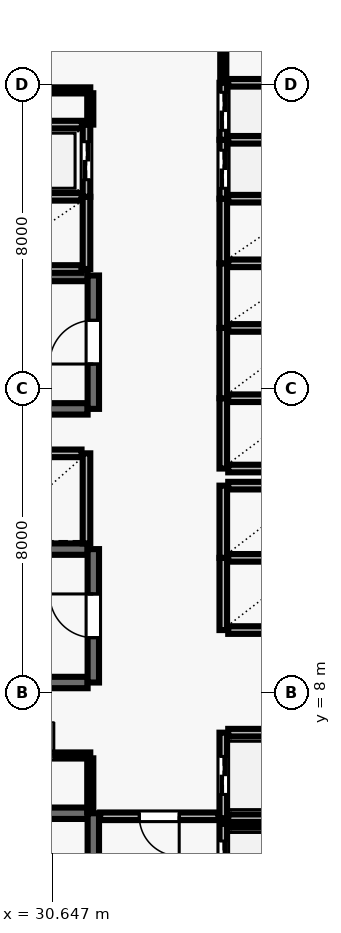
"""IFC4 building model, lengths in metres.
Left out: names, types, materials, properties, quantities, classifications, styles, units other than length and angle.
Written with IfcOpenShell. Run it as: python <this file> out.ifc"""

import sys

from ifc_helpers import new_model, si_unit, direction, frame, frame_2d, origin, place, context, subcontext, project, spatial, rectangle, extrude, element, fill, save


model = new_model("IFC4")
c1 = context("Model", 3, precision=1e-05, world=origin(), true_north=direction((0.0, 1.0)))
c2 = subcontext(c1, "Body", "Model", "MODEL_VIEW")
j1 = project(units=[si_unit("LENGTHUNIT", "METRE"), si_unit("PLANEANGLEUNIT", "RADIAN")], contexts=[c1])
p1 = place(None, origin())
s1 = spatial("IfcSite", under=j1, at=p1, CompositionType="ELEMENT")
p2 = place(p1, origin())
s2 = spatial("IfcBuilding", under=s1, at=p2, CompositionType="ELEMENT")
p3 = place(p2, frame((0.0, 0.0, 81.7)))
s3 = spatial("IfcBuildingStorey", under=s2, at=p3, CompositionType="ELEMENT", Elevation=81.7)
p4 = place(p3, frame((31.58, 4.83, 0.0), z_axis=(0.0, 0.0, 1.0), x_axis=(-1.0, 0.0, 0.0)))
e1 = element("IfcWall", 1, at=p4, inside=s3, PredefinedType="SHEAR", context=c2, shape_type="SweptSolid", body=[
    extrude(rectangle(XDim=8.36, YDim=0.3, at=frame_2d((4.18, 0.0))), origin(), (0.0, 0.0, 1.0), 3.69),
])
p5 = place(p3, frame((31.73, 0.96, 0.0), z_axis=(0.0, 0.0, 1.0), x_axis=(0.0, 1.0, 0.0)))
e2 = element("IfcWall", 2, at=p5, inside=s3, PredefinedType="SHEAR", context=c2, shape_type="SweptSolid", body=[
    extrude(rectangle(XDim=3.87, YDim=0.3, at=frame_2d((1.935, 0.0))), origin(), (0.0, 0.0, 1.0), 3.69),
])
p6 = place(p5, frame((1.54, 0.0, 0.0)))
e3 = element("IfcOpeningElement", 3, at=p6, cuts=e2, PredefinedType="OPENING", context=c2, shape_type="SweptSolid", body=[
    extrude(rectangle(XDim=1.15, YDim=2.15, at=frame_2d((0.575, 1.075))), frame((0.0, 0.16, 0.0), z_axis=(0.0, -1.0, 0.0), x_axis=(1.0, 0.0, 0.0)), (0.0, 0.0, 1.0), 0.32),
])
for number, where, z_axis, x_axis in (
    (4, (31.58, 18.98, 0.0), (0.0, 0.0, 1.0), (-1.0, 0.0, 0.0)),
    (5, (23.22, 15.47, 0.0), (0.0, 0.0, 1.0), (1.0, 0.0, 0.0)),
):
    element("IfcWall", number, at=place(p3, frame(where, z_axis=z_axis, x_axis=x_axis)), inside=s3, PredefinedType="SHEAR", context=c2, shape_type="SweptSolid", body=[
        extrude(rectangle(XDim=8.36, YDim=0.3, at=frame_2d((4.18, 0.0))), origin(), (0.0, 0.0, 1.0), 3.69),
    ])
p7 = place(p3, frame((31.73, 15.47, 0.0), z_axis=(0.0, 0.0, 1.0), x_axis=(0.0, 1.0, 0.0)))
e6 = element("IfcWall", 6, at=p7, inside=s3, PredefinedType="SHEAR", context=c2, shape_type="SweptSolid", body=[
    extrude(rectangle(XDim=3.51, YDim=0.3, at=frame_2d((1.755, 0.0))), origin(), (0.0, 0.0, 1.0), 3.69),
])
p8 = place(p7, frame((1.18, 0.0, 0.0)))
e7 = element("IfcOpeningElement", 7, at=p8, cuts=e6, PredefinedType="OPENING", context=c2, shape_type="SweptSolid", body=[
    extrude(rectangle(XDim=1.15, YDim=2.15, at=frame_2d((0.575, 1.075))), frame((0.0, 0.16, 0.0), z_axis=(0.0, -1.0, 0.0), x_axis=(1.0, 0.0, 0.0)), (0.0, 0.0, 1.0), 0.32),
])
for number, where, z_axis, x_axis in (
    (8, (31.58, 11.78, 0.0), (0.0, 0.0, 1.0), (-1.0, 0.0, 0.0)),
    (9, (23.22, 8.27, 0.0), (0.0, 0.0, 1.0), (1.0, 0.0, 0.0)),
):
    element("IfcWall", number, at=place(p3, frame(where, z_axis=z_axis, x_axis=x_axis)), inside=s3, PredefinedType="SHEAR", context=c2, shape_type="SweptSolid", body=[
        extrude(rectangle(XDim=8.36, YDim=0.3, at=frame_2d((4.18, 0.0))), origin(), (0.0, 0.0, 1.0), 3.69),
    ])
p9 = place(p3, frame((31.73, 8.27, 0.0), z_axis=(0.0, 0.0, 1.0), x_axis=(0.0, 1.0, 0.0)))
e10 = element("IfcWall", 10, at=p9, inside=s3, PredefinedType="SHEAR", context=c2, shape_type="SweptSolid", body=[
    extrude(rectangle(XDim=3.51, YDim=0.3, at=frame_2d((1.755, 0.0))), origin(), (0.0, 0.0, 1.0), 3.69),
])
p10 = place(p9, frame((1.18, 0.0, 0.0)))
e11 = element("IfcOpeningElement", 11, at=p10, cuts=e10, PredefinedType="OPENING", context=c2, shape_type="SweptSolid", body=[
    extrude(rectangle(XDim=1.15, YDim=2.15, at=frame_2d((0.575, 1.075))), frame((0.0, 0.16, 0.0), z_axis=(0.0, -1.0, 0.0), x_axis=(1.0, 0.0, 0.0)), (0.0, 0.0, 1.0), 0.32),
])
p11 = place(p3, frame((35.15, 4.55, 0.0), z_axis=(0.0, 0.0, 1.0), x_axis=(0.0, -1.0, 0.0)))
e12 = element("IfcWall", 12, at=p11, inside=s3, PredefinedType="SOLIDWALL", context=c2, shape_type="SweptSolid", body=[
    extrude(rectangle(XDim=2.1, YDim=0.2, at=frame_2d((1.05, 0.0))), origin(), (0.0, 0.0, 1.0), 3.69),
])
p12 = place(p11, frame((0.45, 0.0, 0.0)))
e13 = element("IfcOpeningElement", 13, at=p12, cuts=e12, PredefinedType="OPENING", context=c2, shape_type="SweptSolid", body=[
    extrude(rectangle(XDim=1.2, YDim=2.15, at=frame_2d((0.6, 1.075))), frame((0.0, 0.11, 0.0), z_axis=(0.0, -1.0, 0.0), x_axis=(1.0, 0.0, 0.0)), (0.0, 0.0, 1.0), 0.22),
])
p13 = place(p3, frame((37.42, 4.55, 0.0), z_axis=(0.0, 0.0, 1.0), x_axis=(-1.0, 0.0, 0.0)))
e14 = element("IfcWall", 14, at=p13, inside=s3, PredefinedType="SOLIDWALL", context=c2, shape_type="SweptSolid", body=[
    extrude(rectangle(XDim=2.14, YDim=0.2, at=frame_2d((1.07, 0.0))), origin(), (0.0, 0.0, 1.0), 3.69),
])
p14 = place(p3, frame((35.15, 6.95, 0.0), z_axis=(0.0, 0.0, 1.0), x_axis=(0.0, -1.0, 0.0)))
e15 = element("IfcWall", 15, at=p14, inside=s3, PredefinedType="SOLIDWALL", context=c2, shape_type="SweptSolid", body=[
    extrude(rectangle(XDim=2.25, YDim=0.2, at=frame_2d((1.125, 0.0))), origin(), (0.0, 0.0, 1.0), 3.69),
])
p15 = place(p14, frame((0.625, 0.0, 0.0)))
e16 = element("IfcOpeningElement", 16, at=p15, cuts=e15, PredefinedType="OPENING", context=c2, shape_type="SweptSolid", body=[
    extrude(rectangle(XDim=1.0, YDim=2.1, at=frame_2d((0.5, 1.05))), frame((0.0, 0.11, 0.0), z_axis=(0.0, -1.0, 0.0), x_axis=(1.0, 0.0, 0.0)), (0.0, 0.0, 1.0), 0.22),
])
for number, where, z_axis, x_axis in (
    (17, (35.28, 4.7, 0.0), (0.0, 0.0, 1.0), (1.0, 0.0, 0.0)),
    (18, (37.42, 6.95, 0.0), (0.0, 0.0, 1.0), (-1.0, 0.0, 0.0)),
):
    element("IfcWall", number, at=place(p3, frame(where, z_axis=z_axis, x_axis=x_axis)), inside=s3, PredefinedType="SOLIDWALL", context=c2, shape_type="SweptSolid", body=[
        extrude(rectangle(XDim=2.14, YDim=0.2, at=frame_2d((1.07, 0.0))), origin(), (0.0, 0.0, 1.0), 3.69),
    ])
p16 = place(p3, frame((35.15, 11.55, 0.0), z_axis=(0.0, 0.0, 1.0), x_axis=(0.0, -1.0, 0.0)))
e19 = element("IfcWall", 19, at=p16, inside=s3, PredefinedType="SOLIDWALL", context=c2, shape_type="SweptSolid", body=[
    extrude(rectangle(XDim=1.9, YDim=0.2, at=frame_2d((0.95, 0.0))), origin(), (0.0, 0.0, 1.0), 3.69),
])
for number, where, z_axis, x_axis in (
    (20, (35.28, 9.65, 0.0), (0.0, 0.0, 1.0), (1.0, 0.0, 0.0)),
    (21, (37.42, 11.55, 0.0), (0.0, 0.0, 1.0), (-1.0, 0.0, 0.0)),
):
    element("IfcWall", number, at=place(p3, frame(where, z_axis=z_axis, x_axis=x_axis)), inside=s3, PredefinedType="SOLIDWALL", context=c2, shape_type="SweptSolid", body=[
        extrude(rectangle(XDim=2.14, YDim=0.2, at=frame_2d((1.07, 0.0))), origin(), (0.0, 0.0, 1.0), 3.69),
    ])
p17 = place(p3, frame((35.15, 13.45, 0.0), z_axis=(0.0, 0.0, 1.0), x_axis=(0.0, -1.0, 0.0)))
e22 = element("IfcWall", 22, at=p17, inside=s3, PredefinedType="SOLIDWALL", context=c2, shape_type="SweptSolid", body=[
    extrude(rectangle(XDim=1.9, YDim=0.2, at=frame_2d((0.95, 0.0))), origin(), (0.0, 0.0, 1.0), 3.69),
])
p18 = place(p3, frame((37.42, 13.45, 0.0), z_axis=(0.0, 0.0, 1.0), x_axis=(-1.0, 0.0, 0.0)))
e23 = element("IfcWall", 23, at=p18, inside=s3, PredefinedType="SOLIDWALL", context=c2, shape_type="SweptSolid", body=[
    extrude(rectangle(XDim=2.14, YDim=0.2, at=frame_2d((1.07, 0.0))), origin(), (0.0, 0.0, 1.0), 3.69),
])
p19 = place(p3, frame((31.55, 11.93, 0.0), z_axis=(0.0, 0.0, 1.0), x_axis=(0.0, 1.0, 0.0)))
e24 = element("IfcWall", 24, at=p19, inside=s3, PredefinedType="SOLIDWALL", context=c2, shape_type="SweptSolid", body=[
    extrude(rectangle(XDim=2.37, YDim=0.2, at=frame_2d((1.185, 0.0))), origin(), (0.0, 0.0, 1.0), 3.69),
])
p20 = place(p3, frame((31.42, 14.3, 0.0), z_axis=(0.0, 0.0, 1.0), x_axis=(-1.0, 0.0, 0.0)))
e25 = element("IfcWall", 25, at=p20, inside=s3, PredefinedType="SOLIDWALL", context=c2, shape_type="SweptSolid", body=[
    extrude(rectangle(XDim=2.44, YDim=0.2, at=frame_2d((1.22, 0.0))), origin(), (0.0, 0.0, 1.0), 3.69),
])
p21 = place(p3, frame((35.15, 15.75, 0.0), z_axis=(0.0, 0.0, 1.0), x_axis=(0.0, -1.0, 0.0)))
e26 = element("IfcWall", 26, at=p21, inside=s3, PredefinedType="SOLIDWALL", context=c2, shape_type="SweptSolid", body=[
    extrude(rectangle(XDim=1.85, YDim=0.2, at=frame_2d((0.925, 0.0))), origin(), (0.0, 0.0, 1.0), 3.69),
])
for number, where, z_axis, x_axis in (
    (27, (35.28, 13.9, 0.0), (0.0, 0.0, 1.0), (1.0, 0.0, 0.0)),
    (28, (37.42, 15.75, 0.0), (0.0, 0.0, 1.0), (-1.0, 0.0, 0.0)),
):
    element("IfcWall", number, at=place(p3, frame(where, z_axis=z_axis, x_axis=x_axis)), inside=s3, PredefinedType="SOLIDWALL", context=c2, shape_type="SweptSolid", body=[
        extrude(rectangle(XDim=2.14, YDim=0.2, at=frame_2d((1.07, 0.0))), origin(), (0.0, 0.0, 1.0), 3.69),
    ])
p22 = place(p3, frame((35.15, 17.6, 0.0), z_axis=(0.0, 0.0, 1.0), x_axis=(0.0, -1.0, 0.0)))
e29 = element("IfcWall", 29, at=p22, inside=s3, PredefinedType="SOLIDWALL", context=c2, shape_type="SweptSolid", body=[
    extrude(rectangle(XDim=1.85, YDim=0.2, at=frame_2d((0.925, 0.0))), origin(), (0.0, 0.0, 1.0), 3.69),
])
p23 = place(p3, frame((37.42, 17.6, 0.0), z_axis=(0.0, 0.0, 1.0), x_axis=(-1.0, 0.0, 0.0)))
e30 = element("IfcWall", 30, at=p23, inside=s3, PredefinedType="SOLIDWALL", context=c2, shape_type="SweptSolid", body=[
    extrude(rectangle(XDim=2.14, YDim=0.2, at=frame_2d((1.07, 0.0))), origin(), (0.0, 0.0, 1.0), 3.69),
])
p24 = place(p3, frame((35.15, 19.3, 0.0), z_axis=(0.0, 0.0, 1.0), x_axis=(0.0, -1.0, 0.0)))
e31 = element("IfcWall", 31, at=p24, inside=s3, PredefinedType="SOLIDWALL", context=c2, shape_type="SweptSolid", body=[
    extrude(rectangle(XDim=1.7, YDim=0.2, at=frame_2d((0.85, 0.0))), origin(), (0.0, 0.0, 1.0), 3.69),
])
p25 = place(p3, frame((37.42, 19.3, 0.0), z_axis=(0.0, 0.0, 1.0), x_axis=(-1.0, 0.0, 0.0)))
e32 = element("IfcWall", 32, at=p25, inside=s3, PredefinedType="SOLIDWALL", context=c2, shape_type="SweptSolid", body=[
    extrude(rectangle(XDim=2.14, YDim=0.2, at=frame_2d((1.07, 0.0))), origin(), (0.0, 0.0, 1.0), 3.69),
])
p26 = place(p3, frame((35.15, 21.0, 0.0), z_axis=(0.0, 0.0, 1.0), x_axis=(0.0, -1.0, 0.0)))
e33 = element("IfcWall", 33, at=p26, inside=s3, PredefinedType="SOLIDWALL", context=c2, shape_type="SweptSolid", body=[
    extrude(rectangle(XDim=1.7, YDim=0.2, at=frame_2d((0.85, 0.0))), origin(), (0.0, 0.0, 1.0), 3.69),
])
p27 = place(p3, frame((37.42, 21.0, 0.0), z_axis=(0.0, 0.0, 1.0), x_axis=(-1.0, 0.0, 0.0)))
e34 = element("IfcWall", 34, at=p27, inside=s3, PredefinedType="SOLIDWALL", context=c2, shape_type="SweptSolid", body=[
    extrude(rectangle(XDim=2.14, YDim=0.2, at=frame_2d((1.07, 0.0))), origin(), (0.0, 0.0, 1.0), 3.69),
])
p28 = place(p3, frame((31.55, 19.15, 0.0), z_axis=(0.0, 0.0, 1.0), x_axis=(0.0, 1.0, 0.0)))
e35 = element("IfcWall", 35, at=p28, inside=s3, PredefinedType="SOLIDWALL", context=c2, shape_type="SweptSolid", body=[
    extrude(rectangle(XDim=1.9, YDim=0.2, at=frame_2d((0.95, 0.0))), origin(), (0.0, 0.0, 1.0), 3.69),
])
for number, where, z_axis, x_axis in (
    (36, (28.98, 19.15, 0.0), (0.0, 0.0, 1.0), (1.0, 0.0, 0.0)),
    (37, (31.42, 21.05, 0.0), (0.0, 0.0, 1.0), (-1.0, 0.0, 0.0)),
):
    element("IfcWall", number, at=place(p3, frame(where, z_axis=z_axis, x_axis=x_axis)), inside=s3, PredefinedType="SOLIDWALL", context=c2, shape_type="SweptSolid", body=[
        extrude(rectangle(XDim=2.44, YDim=0.2, at=frame_2d((1.22, 0.0))), origin(), (0.0, 0.0, 1.0), 3.69),
    ])
p29 = place(p3, frame((35.15, 22.55, 0.0), z_axis=(0.0, 0.0, 1.0), x_axis=(0.0, -1.0, 0.0)))
e38 = element("IfcWall", 38, at=p29, inside=s3, PredefinedType="SOLIDWALL", context=c2, shape_type="SweptSolid", body=[
    extrude(rectangle(XDim=1.55, YDim=0.2, at=frame_2d((0.775, 0.0))), origin(), (0.0, 0.0, 1.0), 3.69),
])
p30 = place(p29, frame((0.275, 0.0, 0.0)))
e39 = element("IfcOpeningElement", 39, at=p30, cuts=e38, PredefinedType="OPENING", context=c2, shape_type="SweptSolid", body=[
    extrude(rectangle(XDim=1.0, YDim=2.1, at=frame_2d((0.5, 1.05))), frame((0.0, 0.11, 0.0), z_axis=(0.0, -1.0, 0.0), x_axis=(1.0, 0.0, 0.0)), (0.0, 0.0, 1.0), 0.22),
])
p31 = place(p3, frame((37.42, 22.55, 0.0), z_axis=(0.0, 0.0, 1.0), x_axis=(-1.0, 0.0, 0.0)))
e40 = element("IfcWall", 40, at=p31, inside=s3, PredefinedType="SOLIDWALL", context=c2, shape_type="SweptSolid", body=[
    extrude(rectangle(XDim=2.14, YDim=0.2, at=frame_2d((1.07, 0.0))), origin(), (0.0, 0.0, 1.0), 3.69),
])
p32 = place(p3, frame((35.15, 24.05, 0.0), z_axis=(0.0, 0.0, 1.0), x_axis=(0.0, -1.0, 0.0)))
e41 = element("IfcWall", 41, at=p32, inside=s3, PredefinedType="SOLIDWALL", context=c2, shape_type="SweptSolid", body=[
    extrude(rectangle(XDim=1.5, YDim=0.2, at=frame_2d((0.75, 0.0))), origin(), (0.0, 0.0, 1.0), 3.69),
])
p33 = place(p32, frame((0.25, 0.0, 0.0)))
e42 = element("IfcOpeningElement", 42, at=p33, cuts=e41, PredefinedType="OPENING", context=c2, shape_type="SweptSolid", body=[
    extrude(rectangle(XDim=1.0, YDim=2.1, at=frame_2d((0.5, 1.05))), frame((0.0, 0.11, 0.0), z_axis=(0.0, -1.0, 0.0), x_axis=(1.0, 0.0, 0.0)), (0.0, 0.0, 1.0), 0.22),
])
p34 = place(p3, frame((37.42, 24.05, 0.0), z_axis=(0.0, 0.0, 1.0), x_axis=(-1.0, 0.0, 0.0)))
e43 = element("IfcWall", 43, at=p34, inside=s3, PredefinedType="SOLIDWALL", context=c2, shape_type="SweptSolid", body=[
    extrude(rectangle(XDim=2.14, YDim=0.2, at=frame_2d((1.07, 0.0))), origin(), (0.0, 0.0, 1.0), 3.69),
])
p35 = place(p3, frame((31.55, 21.05, 0.0), z_axis=(0.0, 0.0, 1.0), x_axis=(0.0, 1.0, 0.0)))
e44 = element("IfcWall", 44, at=p35, inside=s3, PredefinedType="SOLIDWALL", context=c2, shape_type="SweptSolid", body=[
    extrude(rectangle(XDim=1.9, YDim=0.2, at=frame_2d((0.95, 0.0))), origin(), (0.0, 0.0, 1.0), 3.69),
])
p36 = place(p35, frame((0.45, 0.0, 0.0)))
e45 = element("IfcOpeningElement", 45, at=p36, cuts=e44, PredefinedType="OPENING", context=c2, shape_type="SweptSolid", body=[
    extrude(rectangle(XDim=1.0, YDim=2.1, at=frame_2d((0.5, 1.05))), frame((0.0, 0.11, 0.0), z_axis=(0.0, -1.0, 0.0), x_axis=(1.0, 0.0, 0.0)), (0.0, 0.0, 1.0), 0.22),
])
p37 = place(p3, frame((31.43, 22.95, 0.0), z_axis=(0.0, 0.0, 1.0), x_axis=(-1.0, 0.0, 0.0)))
e46 = element("IfcWall", 46, at=p37, inside=s3, PredefinedType="SOLIDWALL", context=c2, shape_type="SweptSolid", body=[
    extrude(rectangle(XDim=2.46, YDim=0.2, at=frame_2d((1.23, 0.0))), origin(), (0.0, 0.0, 1.0), 3.69),
])
p38 = place(p3, frame((28.8, 23.85, 0.0), z_axis=(0.0, 0.0, 1.0), x_axis=(1.0, 0.0, 0.0)))
e47 = element("IfcWall", 47, at=p38, inside=s3, PredefinedType="PARTITIONING", context=c2, shape_type="SweptSolid", body=[
    extrude(rectangle(XDim=2.85, YDim=0.16, at=frame_2d((1.425, 0.0))), origin(), (0.0, 0.0, 1.0), 3.69),
])
p39 = place(p3, frame((28.85, 6.35, 0.0), z_axis=(0.0, 0.0, 1.0), x_axis=(1.0, 0.0, 0.0)))
e48 = element("IfcWall", 48, at=p39, inside=s3, PredefinedType="PARTITIONING", context=c2, shape_type="SweptSolid", body=[
    extrude(rectangle(XDim=2.8, YDim=0.16, at=frame_2d((1.4, 0.0))), origin(), (0.0, 0.0, 1.0), 3.69),
])
p40 = place(p39, frame((0.96, 0.0, 0.0)))
e49 = element("IfcOpeningElement", 49, at=p40, cuts=e48, PredefinedType="OPENING", context=c2, shape_type="SweptSolid", body=[
    extrude(rectangle(XDim=0.88, YDim=2.1, at=frame_2d((0.44, 1.05))), frame((0.0, 0.09, 0.0), z_axis=(0.0, -1.0, 0.0), x_axis=(1.0, 0.0, 0.0)), (0.0, 0.0, 1.0), 0.18),
])
p41 = place(p3, frame((35.02, 4.75, 0.0), z_axis=(0.0, 0.0, 1.0), x_axis=(-1.0, 0.0, 0.0)))
e50 = element("IfcWall", 50, at=p41, inside=s3, PredefinedType="SOLIDWALL", context=c2, shape_type="SweptSolid", body=[
    extrude(rectangle(XDim=3.11, YDim=0.2, at=frame_2d((1.555, 0.0))), origin(), (0.0, 0.0, 1.0), 3.69),
])
p42 = place(p41, frame((1.03, 0.0, 0.0)))
e51 = element("IfcOpeningElement", 51, at=p42, cuts=e50, PredefinedType="OPENING", context=c2, shape_type="SweptSolid", body=[
    extrude(rectangle(XDim=1.05, YDim=2.15, at=frame_2d((0.525, 1.075))), frame((0.0, 0.11, 0.0), z_axis=(0.0, -1.0, 0.0), x_axis=(1.0, 0.0, 0.0)), (0.0, 0.0, 1.0), 0.22),
])
p43 = place(p3, frame((31.65, 4.86, 0.0), z_axis=(0.0, 0.0, 1.0), x_axis=(0.0, 1.0, 0.0)))
e52 = element("IfcWall", 52, at=p43, inside=s3, PredefinedType="PARTITIONING", context=c2, shape_type="SweptSolid", body=[
    extrude(rectangle(XDim=1.415, YDim=0.16, at=frame_2d((0.708, 0.0))), origin(), (0.0, 0.0, 1.0), 3.69),
])
p44 = place(p3, frame((31.65, 23.775, 0.0), z_axis=(0.0, 0.0, 1.0), x_axis=(0.0, -1.0, 0.0)))
e53 = element("IfcWall", 53, at=p44, inside=s3, PredefinedType="PARTITIONING", context=c2, shape_type="SweptSolid", body=[
    extrude(rectangle(XDim=0.825, YDim=0.16, at=frame_2d((0.413, 0.0))), origin(), (0.0, 0.0, 1.0), 3.69),
])
p45 = place(p3, frame((35.15, 24.07, 0.0), z_axis=(0.0, 0.0, 1.0), x_axis=(0.0, 1.0, 0.0)))
e54 = element("IfcWall", 54, at=p45, inside=s3, PredefinedType="PARTITIONING", context=c2, shape_type="SweptSolid", body=[
    extrude(rectangle(XDim=1.855, YDim=0.16, at=frame_2d((0.927, 0.0))), origin(), (0.0, 0.0, 1.0), 3.69),
])
p46 = place(p8, origin())
e55 = element("IfcDoor", 55, at=p46, inside=s3, OperationType="SINGLE_SWING_LEFT", PredefinedType="DOOR", context=c2, shape_type="SweptSolid", body=[
    extrude(rectangle(XDim=1.15, YDim=2.15, at=frame_2d((0.575, 1.075))), frame((0.0, 0.025, 0.0), z_axis=(0.0, -1.0, 0.0), x_axis=(1.0, 0.0, 0.0)), (0.0, 0.0, 1.0), 0.05),
])
fill(e7, e55)
p47 = place(p10, origin())
e56 = element("IfcDoor", 56, at=p47, inside=s3, OperationType="SINGLE_SWING_RIGHT", PredefinedType="DOOR", context=c2, shape_type="SweptSolid", body=[
    extrude(rectangle(XDim=1.15, YDim=2.15, at=frame_2d((0.575, 1.075))), frame((0.0, 0.025, 0.0), z_axis=(0.0, -1.0, 0.0), x_axis=(1.0, 0.0, 0.0)), (0.0, 0.0, 1.0), 0.05),
])
fill(e11, e56)
p48 = place(p12, origin())
e57 = element("IfcDoor", 57, at=p48, inside=s3, OperationType="DOUBLE_DOOR_SLIDING", PredefinedType="DOOR", context=c2, shape_type="SweptSolid", body=[
    extrude(rectangle(XDim=1.2, YDim=2.15, at=frame_2d((0.6, 1.075))), frame((0.0, 0.025, 0.0), z_axis=(0.0, -1.0, 0.0), x_axis=(1.0, 0.0, 0.0)), (0.0, 0.0, 1.0), 0.05),
])
fill(e13, e57)
p49 = place(p15, origin())
e58 = element("IfcDoor", 58, at=p49, inside=s3, OperationType="DOUBLE_DOOR_SLIDING", PredefinedType="DOOR", context=c2, shape_type="SweptSolid", body=[
    extrude(rectangle(XDim=1.0, YDim=2.1, at=frame_2d((0.5, 1.05))), frame((0.0, 0.025, 0.0), z_axis=(0.0, -1.0, 0.0), x_axis=(1.0, 0.0, 0.0)), (0.0, 0.0, 1.0), 0.05),
])
fill(e16, e58)
p50 = place(p30, origin())
e59 = element("IfcDoor", 59, at=p50, inside=s3, OperationType="DOUBLE_DOOR_SLIDING", PredefinedType="DOOR", context=c2, shape_type="SweptSolid", body=[
    extrude(rectangle(XDim=1.0, YDim=2.1, at=frame_2d((0.5, 1.05))), frame((0.0, 0.025, 0.0), z_axis=(0.0, -1.0, 0.0), x_axis=(1.0, 0.0, 0.0)), (0.0, 0.0, 1.0), 0.05),
])
fill(e39, e59)
p51 = place(p33, origin())
e60 = element("IfcDoor", 60, at=p51, inside=s3, OperationType="DOUBLE_DOOR_SLIDING", PredefinedType="DOOR", context=c2, shape_type="SweptSolid", body=[
    extrude(rectangle(XDim=1.0, YDim=2.1, at=frame_2d((0.5, 1.05))), frame((0.0, 0.025, 0.0), z_axis=(0.0, -1.0, 0.0), x_axis=(1.0, 0.0, 0.0)), (0.0, 0.0, 1.0), 0.05),
])
fill(e42, e60)
p52 = place(p36, origin())
e61 = element("IfcDoor", 61, at=p52, inside=s3, OperationType="DOUBLE_DOOR_SLIDING", PredefinedType="DOOR", context=c2, shape_type="SweptSolid", body=[
    extrude(rectangle(XDim=1.0, YDim=2.1, at=frame_2d((0.5, 1.05))), frame((0.0, 0.025, 0.0), z_axis=(0.0, -1.0, 0.0), x_axis=(1.0, 0.0, 0.0)), (0.0, 0.0, 1.0), 0.05),
])
fill(e45, e61)
p53 = place(p42, origin())
e62 = element("IfcDoor", 62, at=p53, inside=s3, OperationType="SINGLE_SWING_LEFT", PredefinedType="DOOR", context=c2, shape_type="SweptSolid", body=[
    extrude(rectangle(XDim=1.05, YDim=2.15, at=frame_2d((0.525, 1.075))), frame((0.0, 0.025, 0.0), z_axis=(0.0, -1.0, 0.0), x_axis=(1.0, 0.0, 0.0)), (0.0, 0.0, 1.0), 0.05),
])
fill(e51, e62)
p54 = place(p40, origin())
e63 = element("IfcDoor", 63, at=p54, inside=s3, OperationType="SINGLE_SWING_RIGHT", PredefinedType="DOOR", context=c2, shape_type="SweptSolid", body=[
    extrude(rectangle(XDim=0.88, YDim=2.1, at=frame_2d((0.44, 1.05))), frame((0.0, 0.025, 0.0), z_axis=(0.0, -1.0, 0.0), x_axis=(1.0, 0.0, 0.0)), (0.0, 0.0, 1.0), 0.05),
])
fill(e49, e63)
save(model, sys.argv[1])
